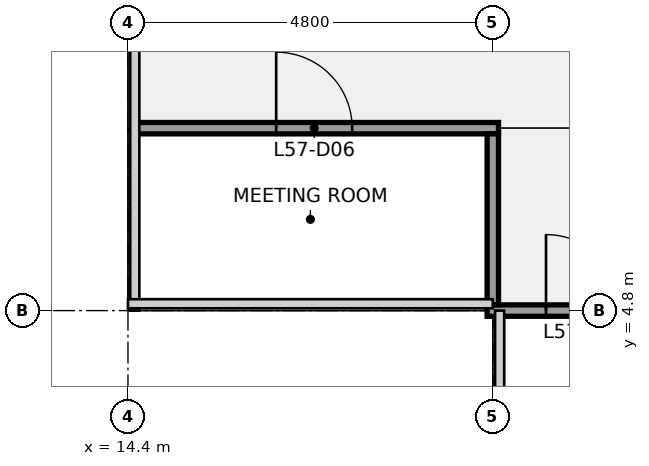
"""IFC4 building model, lengths in metres.
Left out: names, types, materials, properties, quantities, classifications, styles, units other than length and angle.
Written with IfcOpenShell. Run it as: python <this file> out.ifc"""

import sys

from ifc_helpers import new_model, si_unit, direction, frame, frame_2d, origin, place, context, subcontext, project, spatial, rectangle, extrude, element, fill, save


model = new_model("IFC4")
c1 = context("Model", 3, precision=1e-05, world=origin(), true_north=direction((0.0, 1.0)))
c2 = subcontext(c1, "Body", "Model", "MODEL_VIEW")
j1 = project(units=[si_unit("LENGTHUNIT", "METRE"), si_unit("PLANEANGLEUNIT", "RADIAN")], contexts=[c1])
p1 = place(None, origin())
s1 = spatial("IfcSite", under=j1, at=p1, CompositionType="ELEMENT")
p2 = place(p1, origin())
s2 = spatial("IfcBuilding", under=s1, at=p2, CompositionType="ELEMENT")
p3 = place(p2, frame((0.0, 0.0, 257.2)))
s3 = spatial("IfcBuildingStorey", under=s2, at=p3, CompositionType="ELEMENT", Elevation=257.2)
p4 = place(p3, frame((19.125, 4.8, 0.0), z_axis=(0.0, 0.0, 1.0), x_axis=(1.0, 0.0, 0.0)))
e1 = element("IfcWall", 1, at=p4, inside=s3, PredefinedType="PARTITIONING", context=c2, shape_type="SweptSolid", body=[
    extrude(rectangle(XDim=19.35, YDim=0.15, at=frame_2d((9.675, 0.0))), origin(), (0.0, 0.0, 1.0), 2.87),
])
p5 = place(p4, frame((0.775, 0.0, 0.0)))
e2 = element("IfcOpeningElement", 2, at=p5, cuts=e1, PredefinedType="OPENING", context=c2, shape_type="SweptSolid", body=[
    extrude(rectangle(XDim=1.0, YDim=2.1, at=frame_2d((0.5, 1.05))), frame((0.0, 0.085, 0.0), z_axis=(0.0, -1.0, 0.0), x_axis=(1.0, 0.0, 0.0)), (0.0, 0.0, 1.0), 0.17),
])
p6 = place(p4, frame((4.375, 0.0, 0.0)))
e3 = element("IfcOpeningElement", 3, at=p6, cuts=e1, PredefinedType="OPENING", context=c2, shape_type="SweptSolid", body=[
    extrude(rectangle(XDim=1.0, YDim=2.1, at=frame_2d((0.5, 1.05))), frame((0.0, 0.085, 0.0), z_axis=(0.0, -1.0, 0.0), x_axis=(1.0, 0.0, 0.0)), (0.0, 0.0, 1.0), 0.17),
])
p7 = place(p4, frame((7.975, 0.0, 0.0)))
e4 = element("IfcOpeningElement", 4, at=p7, cuts=e1, PredefinedType="OPENING", context=c2, shape_type="SweptSolid", body=[
    extrude(rectangle(XDim=1.0, YDim=2.1, at=frame_2d((0.5, 1.05))), frame((0.0, 0.085, 0.0), z_axis=(0.0, -1.0, 0.0), x_axis=(1.0, 0.0, 0.0)), (0.0, 0.0, 1.0), 0.17),
])
p8 = place(p4, frame((10.375, 0.0, 0.0)))
e5 = element("IfcOpeningElement", 5, at=p8, cuts=e1, PredefinedType="OPENING", context=c2, shape_type="SweptSolid", body=[
    extrude(rectangle(XDim=1.0, YDim=2.1, at=frame_2d((0.5, 1.05))), frame((0.0, 0.085, 0.0), z_axis=(0.0, -1.0, 0.0), x_axis=(1.0, 0.0, 0.0)), (0.0, 0.0, 1.0), 0.17),
])
p9 = place(p4, frame((15.175, 0.0, 0.0)))
e6 = element("IfcOpeningElement", 6, at=p9, cuts=e1, PredefinedType="OPENING", context=c2, shape_type="SweptSolid", body=[
    extrude(rectangle(XDim=1.0, YDim=2.1, at=frame_2d((0.5, 1.05))), frame((0.0, 0.085, 0.0), z_axis=(0.0, -1.0, 0.0), x_axis=(1.0, 0.0, 0.0)), (0.0, 0.0, 1.0), 0.17),
])
p10 = place(p3, frame((14.5, 7.2, 0.0), z_axis=(0.0, 0.0, 1.0), x_axis=(1.0, 0.0, 0.0)))
e7 = element("IfcWall", 7, at=p10, inside=s3, PredefinedType="PARTITIONING", context=c2, shape_type="SweptSolid", body=[
    extrude(rectangle(XDim=4.775, YDim=0.15, at=frame_2d((2.387, 0.0))), origin(), (0.0, 0.0, 1.0), 2.87),
])
p11 = place(p10, frame((1.85, 0.0, 0.0)))
e8 = element("IfcOpeningElement", 8, at=p11, cuts=e7, PredefinedType="OPENING", context=c2, shape_type="SweptSolid", body=[
    extrude(rectangle(XDim=1.0, YDim=2.1, at=frame_2d((0.5, 1.05))), frame((0.0, 0.085, 0.0), z_axis=(0.0, -1.0, 0.0), x_axis=(1.0, 0.0, 0.0)), (0.0, 0.0, 1.0), 0.17),
])
p12 = place(p3, frame((19.2, 4.875, 0.0), z_axis=(0.0, 0.0, 1.0), x_axis=(0.0, 1.0, 0.0)))
e9 = element("IfcWall", 9, at=p12, inside=s3, PredefinedType="PARTITIONING", context=c2, shape_type="SweptSolid", body=[
    extrude(rectangle(XDim=2.25, YDim=0.15, at=frame_2d((1.125, 0.0))), origin(), (0.0, 0.0, 1.0), 2.87),
])
p13 = place(p5, origin())
e10 = element("IfcDoor", 10, at=p13, inside=s3, OperationType="SINGLE_SWING_LEFT", PredefinedType="DOOR", context=c2, shape_type="SweptSolid", body=[
    extrude(rectangle(XDim=1.0, YDim=2.1, at=frame_2d((0.5, 1.05))), frame((0.0, 0.025, 0.0), z_axis=(0.0, -1.0, 0.0), x_axis=(1.0, 0.0, 0.0)), (0.0, 0.0, 1.0), 0.05),
])
fill(e2, e10)
p14 = place(p11, origin())
e11 = element("IfcDoor", 11, at=p14, inside=s3, OperationType="SINGLE_SWING_LEFT", PredefinedType="DOOR", context=c2, shape_type="SweptSolid", body=[
    extrude(rectangle(XDim=1.0, YDim=2.1, at=frame_2d((0.5, 1.05))), frame((0.0, 0.025, 0.0), z_axis=(0.0, -1.0, 0.0), x_axis=(1.0, 0.0, 0.0)), (0.0, 0.0, 1.0), 0.05),
])
fill(e8, e11)
save(model, sys.argv[1])
